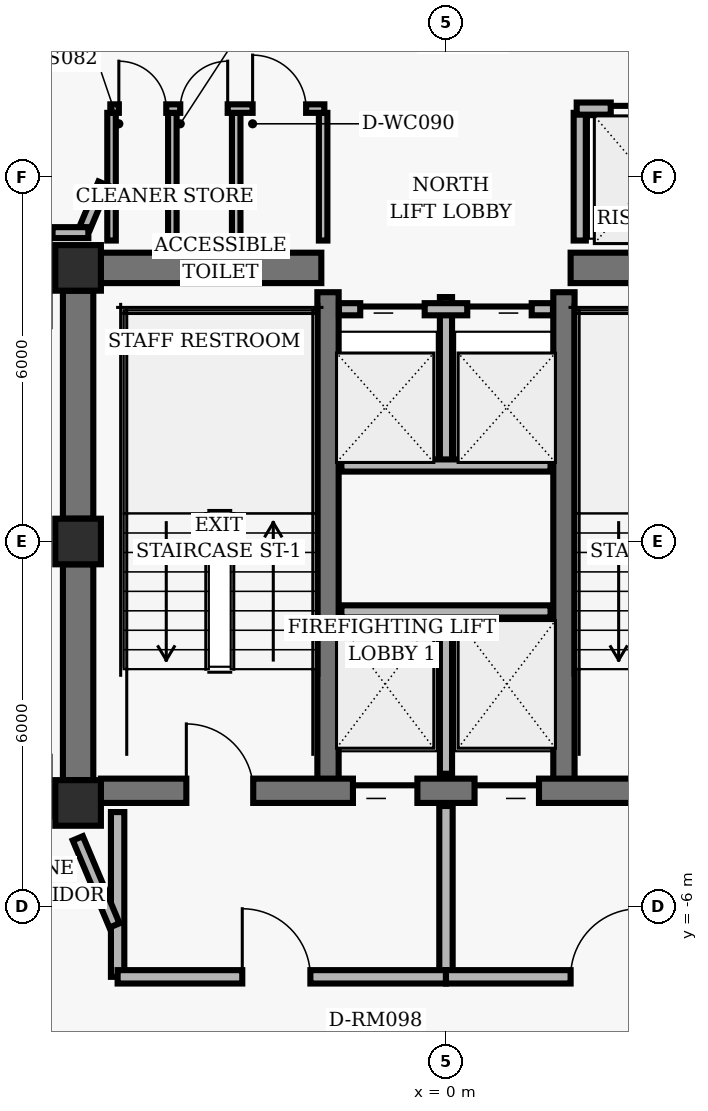
"""IFC4 building model, lengths in metres.
Left out: names, types, materials, properties, quantities, classifications, styles, units other than length and angle.
Written with IfcOpenShell. Run it as: python <this file> out.ifc"""

import sys

from ifc_helpers import new_model, si_unit, direction, frame, frame_2d, origin, origin_2d, place, context, subcontext, project, spatial, rectangle, hollow_rectangle, extrude, element, fill, save


model = new_model("IFC4")
c1 = context("Model", 3, precision=1e-05, world=origin(), true_north=direction((0.0, 1.0)))
c2 = subcontext(c1, "Body", "Model", "MODEL_VIEW")
j1 = project(units=[si_unit("LENGTHUNIT", "METRE"), si_unit("PLANEANGLEUNIT", "RADIAN")], contexts=[c1])
p1 = place(None, origin())
s1 = spatial("IfcSite", under=j1, at=p1, CompositionType="ELEMENT")
p2 = place(p1, origin())
s2 = spatial("IfcBuilding", under=s1, at=p2, CompositionType="ELEMENT")
p3 = place(p2, frame((0.0, 0.0, 184.48)))
s3 = spatial("IfcBuildingStorey", under=s2, at=p3, CompositionType="ELEMENT", Elevation=184.48)
for number, where, z_axis, x_axis in (
    (1, (-6.05, 4.5, 0.0), (0.0, 0.0, 1.0), (1.0, 0.0, 0.0)),
    (2, (-6.05, 0.0, 0.0), (0.0, 0.0, 1.0), (1.0, 0.0, 0.0)),
    (3, (-6.05, -4.3, 0.0), (0.0, 0.0, 1.0), (1.0, 0.0, 0.0)),
):
    element("IfcColumn", number, at=place(p3, frame(where, z_axis=z_axis, x_axis=x_axis)), inside=s3, PredefinedType="COLUMN", context=c2, shape_type="SweptSolid", body=[
        extrude(hollow_rectangle(XDim=0.75, YDim=0.75, WallThickness=0.05, InnerFilletRadius=0.02, OuterFilletRadius=0.04, at=origin_2d()), origin(), (0.0, 0.0, 1.0), 3.04),
    ])
p4 = place(p3, frame((-6.05, 0.375, 0.0), z_axis=(0.0, 0.0, 1.0), x_axis=(0.0, 1.0, 0.0)))
e4 = element("IfcWall", 4, at=p4, inside=s3, PredefinedType="SHEAR", context=c2, shape_type="SweptSolid", body=[
    extrude(rectangle(XDim=3.75, YDim=0.5, at=frame_2d((1.875, 0.0))), origin(), (0.0, 0.0, 1.0), 2.798),
])
p5 = place(p3, frame((-6.05, -3.925, 0.0), z_axis=(0.0, 0.0, 1.0), x_axis=(0.0, 1.0, 0.0)))
e5 = element("IfcWall", 5, at=p5, inside=s3, PredefinedType="SHEAR", context=c2, shape_type="SweptSolid", body=[
    extrude(rectangle(XDim=3.55, YDim=0.5, at=frame_2d((1.775, 0.0))), origin(), (0.0, 0.0, 1.0), 2.798),
])
for number, where, z_axis, x_axis in (
    (6, (-1.94, -4.1, 0.0), (0.0, 0.0, 1.0), (0.0, 1.0, 0.0)),
    (7, (1.94, -4.1, 0.0), (0.0, 0.0, 1.0), (0.0, 1.0, 0.0)),
):
    element("IfcWall", number, at=place(p3, frame(where, z_axis=z_axis, x_axis=x_axis)), inside=s3, PredefinedType="SHEAR", context=c2, shape_type="SweptSolid", body=[
        extrude(rectangle(XDim=8.2, YDim=0.35, at=frame_2d((4.1, 0.0))), origin(), (0.0, 0.0, 1.0), 2.798),
    ])
p6 = place(p3, frame((-5.675, -4.1, 0.0), z_axis=(0.0, 0.0, 1.0), x_axis=(1.0, 0.0, 0.0)))
e8 = element("IfcWall", 8, at=p6, inside=s3, PredefinedType="SHEAR", context=c2, shape_type="SweptSolid", body=[
    extrude(rectangle(XDim=11.35, YDim=0.4, at=frame_2d((5.675, 0.0))), origin(), (0.0, 0.0, 1.0), 2.798),
])
p7 = place(p6, frame((1.405, 0.0, 0.0)))
e9 = element("IfcOpeningElement", 9, at=p7, cuts=e8, PredefinedType="OPENING", context=c2, shape_type="SweptSolid", body=[
    extrude(rectangle(XDim=1.1, YDim=2.04, at=frame_2d((0.55, 1.02))), frame((0.0, 0.21, 0.0), z_axis=(0.0, -1.0, 0.0), x_axis=(1.0, 0.0, 0.0)), (0.0, 0.0, 1.0), 0.42),
])
p8 = place(p6, frame((8.845, 0.0, 0.0)))
e10 = element("IfcOpeningElement", 10, at=p8, cuts=e8, PredefinedType="OPENING", context=c2, shape_type="SweptSolid", body=[
    extrude(rectangle(XDim=1.1, YDim=2.04, at=frame_2d((0.55, 1.02))), frame((0.0, 0.21, 0.0), z_axis=(0.0, -1.0, 0.0), x_axis=(1.0, 0.0, 0.0)), (0.0, 0.0, 1.0), 0.42),
])
p9 = place(p6, frame((4.145, 0.0, 0.0)))
e11 = element("IfcOpeningElement", 11, at=p9, cuts=e8, PredefinedType="OPENING", context=c2, shape_type="SweptSolid", body=[
    extrude(rectangle(XDim=1.06, YDim=2.04, at=frame_2d((0.53, 1.02))), frame((0.0, 0.21, 0.0), z_axis=(0.0, -1.0, 0.0), x_axis=(1.0, 0.0, 0.0)), (0.0, 0.0, 1.0), 0.42),
])
p10 = place(p6, frame((6.145, 0.0, 0.0)))
e12 = element("IfcOpeningElement", 12, at=p10, cuts=e8, PredefinedType="OPENING", context=c2, shape_type="SweptSolid", body=[
    extrude(rectangle(XDim=1.06, YDim=2.04, at=frame_2d((0.53, 1.02))), frame((0.0, 0.21, 0.0), z_axis=(0.0, -1.0, 0.0), x_axis=(1.0, 0.0, 0.0)), (0.0, 0.0, 1.0), 0.42),
])
for number, where, z_axis, x_axis in (
    (13, (-5.675, 4.5, 0.0), (0.0, 0.0, 1.0), (1.0, 0.0, 0.0)),
    (14, (2.05, 4.5, 0.0), (0.0, 0.0, 1.0), (1.0, 0.0, 0.0)),
):
    element("IfcWall", number, at=place(p3, frame(where, z_axis=z_axis, x_axis=x_axis)), inside=s3, PredefinedType="SHEAR", context=c2, shape_type="SweptSolid", body=[
        extrude(rectangle(XDim=3.625, YDim=0.5, at=frame_2d((1.812, 0.0))), origin(), (0.0, 0.0, 1.0), 2.798),
    ])
p11 = place(p3, frame((0.0, -3.82, 0.0), z_axis=(0.0, 0.0, 1.0), x_axis=(0.0, 1.0, 0.0)))
e15 = element("IfcWall", 15, at=p11, inside=s3, PredefinedType="PARTITIONING", context=c2, shape_type="SweptSolid", body=[
    extrude(rectangle(XDim=2.67, YDim=0.2, at=frame_2d((1.335, 0.0))), origin(), (0.0, 0.0, 1.0), 2.773),
])
p12 = place(p3, frame((-1.72, -1.15, 0.0), z_axis=(0.0, 0.0, 1.0), x_axis=(1.0, 0.0, 0.0)))
e16 = element("IfcWall", 16, at=p12, inside=s3, PredefinedType="PARTITIONING", context=c2, shape_type="SweptSolid", body=[
    extrude(rectangle(XDim=3.44, YDim=0.2, at=frame_2d((1.72, 0.0))), origin(), (0.0, 0.0, 1.0), 2.773),
])
p13 = place(p3, frame((-5.4, -7.16, 0.0), z_axis=(0.0, 0.0, 1.0), x_axis=(0.0, 1.0, 0.0)))
e17 = element("IfcWall", 17, at=p13, inside=s3, PredefinedType="PARTITIONING", context=c2, shape_type="SweptSolid", body=[
    extrude(rectangle(XDim=2.71, YDim=0.22, at=frame_2d((1.355, 0.0))), origin(), (0.0, 0.0, 1.0), 2.773),
])
p14 = place(p3, frame((0.0, -7.16, 0.0), z_axis=(0.0, 0.0, 1.0), x_axis=(0.0, 1.0, 0.0)))
e18 = element("IfcWall", 18, at=p14, inside=s3, PredefinedType="PARTITIONING", context=c2, shape_type="SweptSolid", body=[
    extrude(rectangle(XDim=2.81, YDim=0.22, at=frame_2d((1.405, 0.0))), origin(), (0.0, 0.0, 1.0), 2.773),
])
p15 = place(p3, frame((-5.4, -7.16, 0.0), z_axis=(0.0, 0.0, 1.0), x_axis=(1.0, 0.0, 0.0)))
e19 = element("IfcWall", 19, at=p15, inside=s3, PredefinedType="PARTITIONING", context=c2, shape_type="SweptSolid", body=[
    extrude(rectangle(XDim=5.4, YDim=0.22, at=frame_2d((2.7, 0.0))), origin(), (0.0, 0.0, 1.0), 2.395),
])
p16 = place(p15, frame((2.05, 0.0, 0.0)))
e20 = element("IfcOpeningElement", 20, at=p16, cuts=e19, PredefinedType="OPENING", context=c2, shape_type="SweptSolid", body=[
    extrude(rectangle(XDim=1.12, YDim=2.02, at=frame_2d((0.56, 1.01))), frame((0.0, 0.12, 0.0), z_axis=(0.0, -1.0, 0.0), x_axis=(1.0, 0.0, 0.0)), (0.0, 0.0, 1.0), 0.24),
])
p17 = place(p3, frame((0.0, -7.16, 0.0), z_axis=(0.0, 0.0, 1.0), x_axis=(1.0, 0.0, 0.0)))
e21 = element("IfcWall", 21, at=p17, inside=s3, PredefinedType="PARTITIONING", context=c2, shape_type="SweptSolid", body=[
    extrude(rectangle(XDim=5.4, YDim=0.22, at=frame_2d((2.7, 0.0))), origin(), (0.0, 0.0, 1.0), 2.395),
])
p18 = place(p17, frame((2.05, 0.0, 0.0)))
e22 = element("IfcOpeningElement", 22, at=p18, cuts=e21, PredefinedType="OPENING", context=c2, shape_type="SweptSolid", body=[
    extrude(rectangle(XDim=1.12, YDim=2.02, at=frame_2d((0.56, 1.01))), frame((0.0, 0.12, 0.0), z_axis=(0.0, -1.0, 0.0), x_axis=(1.0, 0.0, 0.0)), (0.0, 0.0, 1.0), 0.24),
])
p19 = place(p3, frame((0.0, 1.25, 0.0), z_axis=(0.0, 0.0, 1.0), x_axis=(0.0, 1.0, 0.0)))
e23 = element("IfcWall", 23, at=p19, inside=s3, PredefinedType="PARTITIONING", context=c2, shape_type="SweptSolid", body=[
    extrude(rectangle(XDim=2.77, YDim=0.2, at=frame_2d((1.385, 0.0))), origin(), (0.0, 0.0, 1.0), 2.773),
])
p20 = place(p3, frame((-1.72, 1.25, 0.0), z_axis=(0.0, 0.0, 1.0), x_axis=(1.0, 0.0, 0.0)))
e24 = element("IfcWall", 24, at=p20, inside=s3, PredefinedType="PARTITIONING", context=c2, shape_type="SweptSolid", body=[
    extrude(rectangle(XDim=3.44, YDim=0.2, at=frame_2d((1.72, 0.0))), origin(), (0.0, 0.0, 1.0), 2.773),
])
p21 = place(p3, frame((-1.76, 3.82, 0.0), z_axis=(0.0, 0.0, 1.0), x_axis=(1.0, 0.0, 0.0)))
e25 = element("IfcWall", 25, at=p21, inside=s3, PredefinedType="PARTITIONING", context=c2, shape_type="SweptSolid", body=[
    extrude(rectangle(XDim=3.52, YDim=0.2, at=frame_2d((1.76, 0.0))), origin(), (0.0, 0.0, 1.0), 2.773),
])
p22 = place(p21, frame((0.35, 0.0, 0.0)))
e26 = element("IfcOpeningElement", 26, at=p22, cuts=e25, PredefinedType="OPENING", context=c2, shape_type="SweptSolid", body=[
    extrude(rectangle(XDim=1.06, YDim=2.04, at=frame_2d((0.53, 1.02))), frame((0.0, 0.11, 0.0), z_axis=(0.0, -1.0, 0.0), x_axis=(1.0, 0.0, 0.0)), (0.0, 0.0, 1.0), 0.22),
])
p23 = place(p21, frame((2.11, 0.0, 0.0)))
e27 = element("IfcOpeningElement", 27, at=p23, cuts=e25, PredefinedType="OPENING", context=c2, shape_type="SweptSolid", body=[
    extrude(rectangle(XDim=1.06, YDim=2.04, at=frame_2d((0.53, 1.02))), frame((0.0, 0.11, 0.0), z_axis=(0.0, -1.0, 0.0), x_axis=(1.0, 0.0, 0.0)), (0.0, 0.0, 1.0), 0.22),
])
p24 = place(p3, frame((2.2, 4.95, 0.0), z_axis=(0.0, 0.0, 1.0), x_axis=(0.0, 1.0, 0.0)))
e28 = element("IfcWall", 28, at=p24, inside=s3, PredefinedType="PARTITIONING", context=c2, shape_type="SweptSolid", body=[
    extrude(rectangle(XDim=2.1, YDim=0.2, at=frame_2d((1.05, 0.0))), origin(), (0.0, 0.0, 1.0), 2.773),
])
p25 = place(p3, frame((2.15, 7.12, 0.0), z_axis=(0.0, 0.0, 1.0), x_axis=(1.0, 0.0, 0.0)))
e29 = element("IfcWall", 29, at=p25, inside=s3, PredefinedType="PARTITIONING", context=c2, shape_type="SweptSolid", body=[
    extrude(rectangle(XDim=2.38, YDim=0.2, at=frame_2d((1.19, 0.0))), origin(), (0.0, 0.0, 1.0), 2.773),
])
p26 = place(p25, frame((0.56, 0.0, 0.0)))
e30 = element("IfcOpeningElement", 30, at=p26, cuts=e29, PredefinedType="OPENING", context=c2, shape_type="SweptSolid", body=[
    extrude(rectangle(XDim=1.26, YDim=2.06, at=frame_2d((0.63, 1.03))), frame((0.0, 0.11, 0.0), z_axis=(0.0, -1.0, 0.0), x_axis=(1.0, 0.0, 0.0)), (0.0, 0.0, 1.0), 0.22),
])
for number, where, z_axis, x_axis in (
    (31, (-5.5, 4.95, 0.0), (0.0, 0.0, 1.0), (0.0, 1.0, 0.0)),
    (32, (-4.5, 4.95, 0.0), (0.0, 0.0, 1.0), (0.0, 1.0, 0.0)),
    (33, (-3.45, 4.95, 0.0), (0.0, 0.0, 1.0), (0.0, 1.0, 0.0)),
    (34, (-2.02, 4.95, 0.0), (0.0, 0.0, 1.0), (0.0, 1.0, 0.0)),
):
    element("IfcWall", number, at=place(p3, frame(where, z_axis=z_axis, x_axis=x_axis)), inside=s3, PredefinedType="PARTITIONING", context=c2, shape_type="SweptSolid", body=[
        extrude(rectangle(XDim=2.1, YDim=0.14, at=frame_2d((1.05, 0.0))), origin(), (0.0, 0.0, 1.0), 2.773),
    ])
p27 = place(p3, frame((-5.52, 7.12, 0.0), z_axis=(0.0, 0.0, 1.0), x_axis=(1.0, 0.0, 0.0)))
e35 = element("IfcWall", 35, at=p27, inside=s3, PredefinedType="PARTITIONING", context=c2, shape_type="SweptSolid", body=[
    extrude(rectangle(XDim=3.52, YDim=0.14, at=frame_2d((1.76, 0.0))), origin(), (0.0, 0.0, 1.0), 2.773),
])
p28 = place(p27, frame((0.14, 0.0, 0.0)))
e36 = element("IfcOpeningElement", 36, at=p28, cuts=e35, PredefinedType="OPENING", context=c2, shape_type="SweptSolid", body=[
    extrude(rectangle(XDim=0.78, YDim=2.01, at=frame_2d((0.39, 1.005))), frame((0.0, 0.08, 0.0), z_axis=(0.0, -1.0, 0.0), x_axis=(1.0, 0.0, 0.0)), (0.0, 0.0, 1.0), 0.16),
])
p29 = place(p27, frame((1.15, 0.0, 0.0)))
e37 = element("IfcOpeningElement", 37, at=p29, cuts=e35, PredefinedType="OPENING", context=c2, shape_type="SweptSolid", body=[
    extrude(rectangle(XDim=0.78, YDim=2.01, at=frame_2d((0.39, 1.005))), frame((0.0, 0.08, 0.0), z_axis=(0.0, -1.0, 0.0), x_axis=(1.0, 0.0, 0.0)), (0.0, 0.0, 1.0), 0.16),
])
p30 = place(p27, frame((2.34, 0.0, 0.0)))
e38 = element("IfcOpeningElement", 38, at=p30, cuts=e35, PredefinedType="OPENING", context=c2, shape_type="SweptSolid", body=[
    extrude(rectangle(XDim=0.88, YDim=2.02, at=frame_2d((0.44, 1.01))), frame((0.0, 0.08, 0.0), z_axis=(0.0, -1.0, 0.0), x_axis=(1.0, 0.0, 0.0)), (0.0, 0.0, 1.0), 0.16),
])
p31 = place(p3, frame((-5.632, 5.887, 0.0), z_axis=(0.0, 0.0, 1.0), x_axis=(-0.387792833522, -0.921746558588, 0.0)))
e39 = element("IfcWall", 39, at=p31, inside=s3, PredefinedType="PARTITIONING", context=c2, shape_type="SweptSolid", body=[
    extrude(rectangle(XDim=0.785, YDim=0.18, at=frame_2d((0.393, 0.0))), origin(), (0.0, 0.0, 1.0), 2.773),
])
p32 = place(p3, frame((-5.881, 5.08, 0.0), z_axis=(0.0, 0.0, 1.0), x_axis=(-1.0, 0.0, 0.0)))
e40 = element("IfcWall", 40, at=p32, inside=s3, PredefinedType="PARTITIONING", context=c2, shape_type="SweptSolid", body=[
    extrude(rectangle(XDim=0.589, YDim=0.18, at=frame_2d((0.294, 0.0))), origin(), (0.0, 0.0, 1.0), 2.773),
])
p33 = place(p3, frame((-6.055, -4.882, 0.0), z_axis=(0.0, 0.0, 1.0), x_axis=(0.387579540458, -0.921836265189, 0.0)))
e41 = element("IfcWall", 41, at=p33, inside=s3, PredefinedType="PARTITIONING", context=c2, shape_type="SweptSolid", body=[
    extrude(rectangle(XDim=1.555, YDim=0.18, at=frame_2d((0.777, 0.0))), origin(), (0.0, 0.0, 1.0), 2.773),
])
p34 = place(p7, origin())
e42 = element("IfcDoor", 42, at=p34, inside=s3, OperationType="SINGLE_SWING_LEFT", PredefinedType="DOOR", context=c2, shape_type="SweptSolid", body=[
    extrude(rectangle(XDim=1.1, YDim=2.04, at=frame_2d((0.55, 1.02))), frame((0.0, 0.025, 0.0), z_axis=(0.0, -1.0, 0.0), x_axis=(1.0, 0.0, 0.0)), (0.0, 0.0, 1.0), 0.05),
])
fill(e9, e42)
p35 = place(p9, origin())
e43 = element("IfcDoor", 43, at=p35, inside=s3, OperationType="SLIDING_TO_LEFT", PredefinedType="DOOR", context=c2, shape_type="SweptSolid", body=[
    extrude(rectangle(XDim=1.06, YDim=2.04, at=frame_2d((0.53, 1.02))), frame((0.0, 0.025, 0.0), z_axis=(0.0, -1.0, 0.0), x_axis=(1.0, 0.0, 0.0)), (0.0, 0.0, 1.0), 0.05),
])
fill(e11, e43)
p36 = place(p10, origin())
e44 = element("IfcDoor", 44, at=p36, inside=s3, OperationType="SLIDING_TO_RIGHT", PredefinedType="DOOR", context=c2, shape_type="SweptSolid", body=[
    extrude(rectangle(XDim=1.06, YDim=2.04, at=frame_2d((0.53, 1.02))), frame((0.0, 0.025, 0.0), z_axis=(0.0, -1.0, 0.0), x_axis=(1.0, 0.0, 0.0)), (0.0, 0.0, 1.0), 0.05),
])
fill(e12, e44)
p37 = place(p16, origin())
e45 = element("IfcDoor", 45, at=p37, inside=s3, OperationType="SINGLE_SWING_LEFT", PredefinedType="DOOR", context=c2, shape_type="SweptSolid", body=[
    extrude(rectangle(XDim=1.12, YDim=2.02, at=frame_2d((0.56, 1.01))), frame((0.0, 0.025, 0.0), z_axis=(0.0, -1.0, 0.0), x_axis=(1.0, 0.0, 0.0)), (0.0, 0.0, 1.0), 0.05),
])
fill(e20, e45)
p38 = place(p18, origin())
e46 = element("IfcDoor", 46, at=p38, inside=s3, OperationType="SINGLE_SWING_RIGHT", PredefinedType="DOOR", context=c2, shape_type="SweptSolid", body=[
    extrude(rectangle(XDim=1.12, YDim=2.02, at=frame_2d((0.56, 1.01))), frame((0.0, 0.025, 0.0), z_axis=(0.0, -1.0, 0.0), x_axis=(1.0, 0.0, 0.0)), (0.0, 0.0, 1.0), 0.05),
])
fill(e22, e46)
p39 = place(p22, origin())
e47 = element("IfcDoor", 47, at=p39, inside=s3, OperationType="SLIDING_TO_LEFT", PredefinedType="DOOR", context=c2, shape_type="SweptSolid", body=[
    extrude(rectangle(XDim=1.06, YDim=2.04, at=frame_2d((0.53, 1.02))), frame((0.0, 0.025, 0.0), z_axis=(0.0, -1.0, 0.0), x_axis=(1.0, 0.0, 0.0)), (0.0, 0.0, 1.0), 0.05),
])
fill(e26, e47)
p40 = place(p23, origin())
e48 = element("IfcDoor", 48, at=p40, inside=s3, OperationType="SLIDING_TO_RIGHT", PredefinedType="DOOR", context=c2, shape_type="SweptSolid", body=[
    extrude(rectangle(XDim=1.06, YDim=2.04, at=frame_2d((0.53, 1.02))), frame((0.0, 0.025, 0.0), z_axis=(0.0, -1.0, 0.0), x_axis=(1.0, 0.0, 0.0)), (0.0, 0.0, 1.0), 0.05),
])
fill(e27, e48)
p41 = place(p26, origin())
e49 = element("IfcDoor", 49, at=p41, inside=s3, OperationType="SLIDING_TO_LEFT", PredefinedType="DOOR", context=c2, shape_type="SweptSolid", body=[
    extrude(rectangle(XDim=1.26, YDim=2.06, at=frame_2d((0.63, 1.03))), frame((0.0, 0.025, 0.0), z_axis=(0.0, -1.0, 0.0), x_axis=(1.0, 0.0, 0.0)), (0.0, 0.0, 1.0), 0.05),
])
fill(e30, e49)
p42 = place(p28, origin())
e50 = element("IfcDoor", 50, at=p42, inside=s3, OperationType="SINGLE_SWING_LEFT", PredefinedType="DOOR", context=c2, shape_type="SweptSolid", body=[
    extrude(rectangle(XDim=0.78, YDim=2.01, at=frame_2d((0.39, 1.005))), frame((0.0, 0.025, 0.0), z_axis=(0.0, -1.0, 0.0), x_axis=(1.0, 0.0, 0.0)), (0.0, 0.0, 1.0), 0.05),
])
fill(e36, e50)
p43 = place(p29, origin())
e51 = element("IfcDoor", 51, at=p43, inside=s3, OperationType="SINGLE_SWING_RIGHT", PredefinedType="DOOR", context=c2, shape_type="SweptSolid", body=[
    extrude(rectangle(XDim=0.78, YDim=2.01, at=frame_2d((0.39, 1.005))), frame((0.0, 0.025, 0.0), z_axis=(0.0, -1.0, 0.0), x_axis=(1.0, 0.0, 0.0)), (0.0, 0.0, 1.0), 0.05),
])
fill(e37, e51)
p44 = place(p30, origin())
e52 = element("IfcDoor", 52, at=p44, inside=s3, OperationType="SINGLE_SWING_LEFT", PredefinedType="DOOR", context=c2, shape_type="SweptSolid", body=[
    extrude(rectangle(XDim=0.88, YDim=2.02, at=frame_2d((0.44, 1.01))), frame((0.0, 0.025, 0.0), z_axis=(0.0, -1.0, 0.0), x_axis=(1.0, 0.0, 0.0)), (0.0, 0.0, 1.0), 0.05),
])
fill(e38, e52)
save(model, sys.argv[1])
